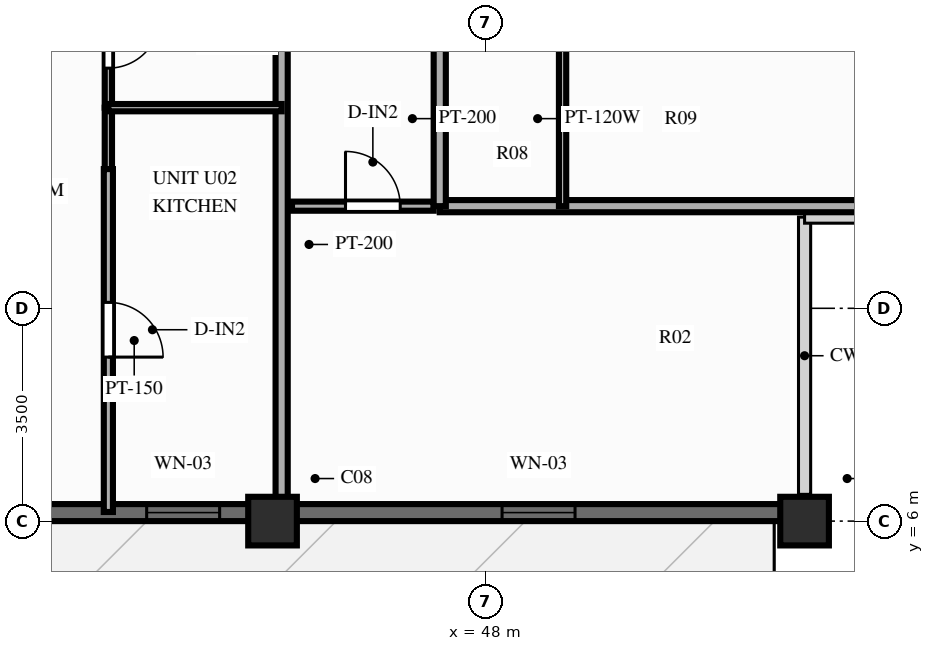
"""IFC4 building model, lengths in metres.
Left out: names, types, materials, properties, quantities, classifications, styles, units other than length and angle.
Written with IfcOpenShell. Run it as: python <this file> out.ifc"""

import sys

from ifc_helpers import new_model, si_unit, direction, frame, frame_2d, origin, origin_2d, place, context, subcontext, project, spatial, rectangle, extrude, source, transform, mapped, element, fill, save


model = new_model("IFC4")
c1 = context("Model", 3, precision=1e-05, world=origin(), true_north=direction((0.0, 1.0)))
c2 = subcontext(c1, "Body", "Model", "MODEL_VIEW")
j1 = project(units=[si_unit("LENGTHUNIT", "METRE"), si_unit("PLANEANGLEUNIT", "RADIAN")], contexts=[c1])
p1 = place(None, origin())
s1 = spatial("IfcSite", under=j1, at=p1, CompositionType="ELEMENT")
p2 = place(p1, origin())
s2 = spatial("IfcBuilding", under=s1, at=p2, CompositionType="ELEMENT")
p3 = place(p2, frame((0.0, 0.0, 176.8)))
s3 = spatial("IfcBuildingStorey", under=s2, at=p3, CompositionType="ELEMENT", Elevation=176.8)
m1 = source(origin(), c2, "Body", "SweptSolid", [
    extrude(rectangle(XDim=0.8, YDim=0.8, at=origin_2d()), origin(), (0.0, 0.0, 1.0), 3.0),
])
for number, where, z_axis, x_axis in (
    (1, (44.5, 6.0, 0.0), (0.0, 0.0, 1.0), (1.0, 0.0, 0.0)),
    (2, (53.25, 6.0, 0.0), (0.0, 0.0, 1.0), (1.0, 0.0, 0.0)),
):
    element("IfcColumn", number, at=place(p3, frame(where, z_axis=z_axis, x_axis=x_axis)), inside=s3, PredefinedType="COLUMN", context=c2, shape_type="MappedRepresentation", body=[
        mapped(m1, transform((0.0, 0.0, 0.0), scale=1.0)),
    ])
p4 = place(p3, frame((22.75, 6.14, 0.0), z_axis=(0.0, 0.0, 1.0), x_axis=(1.0, 0.0, 0.0)))
e3 = element("IfcWall", 3, at=p4, inside=s3, PredefinedType="SOLIDWALL", context=c2, shape_type="SweptSolid", body=[
    extrude(rectangle(XDim=30.5, YDim=0.28, at=frame_2d((15.25, 0.0))), origin(), (0.0, 0.0, 1.0), 2.28),
])
p5 = place(p4, frame((4.925, 0.0, 0.0), z_axis=(0.0, 0.0, 1.0), x_axis=(-1.0, 0.0, 0.0)))
e4 = element("IfcOpeningElement", 4, at=p5, cuts=e3, PredefinedType="OPENING", context=c2, shape_type="SweptSolid", body=[
    extrude(rectangle(XDim=1.1, YDim=2.15, at=frame_2d((0.55, 1.075))), frame((0.0, 0.152, 0.0), z_axis=(0.0, -1.0, 0.0), x_axis=(1.0, 0.0, 0.0)), (0.0, 0.0, 1.0), 0.304),
])
p6 = place(p4, frame((9.42, 0.0, 0.25)))
e5 = element("IfcOpeningElement", 5, at=p6, cuts=e3, PredefinedType="OPENING", context=c2, shape_type="SweptSolid", body=[
    extrude(rectangle(XDim=0.95, YDim=1.5, at=frame_2d((0.475, 0.75))), frame((0.0, 0.152, 0.0), z_axis=(0.0, -1.0, 0.0), x_axis=(1.0, 0.0, 0.0)), (0.0, 0.0, 1.0), 0.304),
])
p7 = place(p4, frame((11.244, 0.0, 0.25)))
e6 = element("IfcOpeningElement", 6, at=p7, cuts=e3, PredefinedType="OPENING", context=c2, shape_type="SweptSolid", body=[
    extrude(rectangle(XDim=1.2, YDim=1.5, at=frame_2d((0.6, 0.75))), frame((0.0, 0.152, 0.0), z_axis=(0.0, -1.0, 0.0), x_axis=(1.0, 0.0, 0.0)), (0.0, 0.0, 1.0), 0.304),
])
p8 = place(p4, frame((13.602, 0.0, 0.25)))
e7 = element("IfcOpeningElement", 7, at=p8, cuts=e3, PredefinedType="OPENING", context=c2, shape_type="SweptSolid", body=[
    extrude(rectangle(XDim=1.2, YDim=1.5, at=frame_2d((0.6, 0.75))), frame((0.0, 0.152, 0.0), z_axis=(0.0, -1.0, 0.0), x_axis=(1.0, 0.0, 0.0)), (0.0, 0.0, 1.0), 0.304),
])
p9 = place(p4, frame((16.683, 0.0, 0.25)))
e8 = element("IfcOpeningElement", 8, at=p9, cuts=e3, PredefinedType="OPENING", context=c2, shape_type="SweptSolid", body=[
    extrude(rectangle(XDim=1.2, YDim=1.5, at=frame_2d((0.6, 0.75))), frame((0.0, 0.152, 0.0), z_axis=(0.0, -1.0, 0.0), x_axis=(1.0, 0.0, 0.0)), (0.0, 0.0, 1.0), 0.304),
])
p10 = place(p4, frame((19.68, 0.0, 0.25)))
e9 = element("IfcOpeningElement", 9, at=p10, cuts=e3, PredefinedType="OPENING", context=c2, shape_type="SweptSolid", body=[
    extrude(rectangle(XDim=1.2, YDim=1.5, at=frame_2d((0.6, 0.75))), frame((0.0, 0.152, 0.0), z_axis=(0.0, -1.0, 0.0), x_axis=(1.0, 0.0, 0.0)), (0.0, 0.0, 1.0), 0.304),
])
p11 = place(p4, frame((25.525, 0.0, 0.25)))
e10 = element("IfcOpeningElement", 10, at=p11, cuts=e3, PredefinedType="OPENING", context=c2, shape_type="SweptSolid", body=[
    extrude(rectangle(XDim=1.2, YDim=1.5, at=frame_2d((0.6, 0.75))), frame((0.0, 0.152, 0.0), z_axis=(0.0, -1.0, 0.0), x_axis=(1.0, 0.0, 0.0)), (0.0, 0.0, 1.0), 0.304),
])
p12 = place(p3, frame((44.82, 11.18, 0.0), z_axis=(0.0, 0.0, 1.0), x_axis=(1.0, 0.0, 0.0)))
e11 = element("IfcWall", 11, at=p12, inside=s3, PredefinedType="PARTITIONING", context=c2, shape_type="SweptSolid", body=[
    extrude(rectangle(XDim=2.33, YDim=0.15, at=frame_2d((1.165, 0.0))), origin(), (0.0, 0.0, 1.0), 2.79),
])
p13 = place(p12, frame((0.88, 0.0, 0.0)))
e12 = element("IfcOpeningElement", 12, at=p13, cuts=e11, PredefinedType="OPENING", context=c2, shape_type="SweptSolid", body=[
    extrude(rectangle(XDim=0.9, YDim=2.1, at=frame_2d((0.45, 1.05))), frame((0.0, 0.087, 0.0), z_axis=(0.0, -1.0, 0.0), x_axis=(1.0, 0.0, 0.0)), (0.0, 0.0, 1.0), 0.174),
])
p14 = place(p3, frame((44.65, 14.95, 0.0), z_axis=(0.0, 0.0, 1.0), x_axis=(0.0, -1.0, 0.0)))
e13 = element("IfcWall", 13, at=p14, inside=s3, PredefinedType="PARTITIONING", context=c2, shape_type="SweptSolid", body=[
    extrude(rectangle(XDim=8.8, YDim=0.2, at=frame_2d((4.4, 0.0))), origin(), (0.0, 0.0, 1.0), 2.39),
])
p15 = place(p3, frame((41.8, 14.95, 0.0), z_axis=(0.0, 0.0, 1.0), x_axis=(0.0, -1.0, 0.0)))
e14 = element("IfcWall", 14, at=p15, inside=s3, PredefinedType="PARTITIONING", context=c2, shape_type="SweptSolid", body=[
    extrude(rectangle(XDim=2.15, YDim=0.12, at=frame_2d((1.075, 0.0))), origin(), (0.0, 0.0, 1.0), 2.79),
])
p16 = place(p15, frame((0.65, 0.0, 0.0)))
e15 = element("IfcOpeningElement", 15, at=p16, cuts=e14, PredefinedType="OPENING", context=c2, shape_type="SweptSolid", body=[
    extrude(rectangle(XDim=0.85, YDim=2.05, at=frame_2d((0.425, 1.025))), frame((0.0, 0.072, 0.0), z_axis=(0.0, -1.0, 0.0), x_axis=(1.0, 0.0, 0.0)), (0.0, 0.0, 1.0), 0.144),
])
p17 = place(p3, frame((41.8, 12.8, 0.0), z_axis=(0.0, 0.0, 1.0), x_axis=(0.0, -1.0, 0.0)))
e16 = element("IfcWall", 16, at=p17, inside=s3, PredefinedType="PARTITIONING", context=c2, shape_type="SweptSolid", body=[
    extrude(rectangle(XDim=1.01, YDim=0.12, at=frame_2d((0.505, 0.0))), origin(), (0.0, 0.0, 1.0), 2.79),
])
p18 = place(p3, frame((41.8, 12.8, 0.0), z_axis=(0.0, 0.0, 1.0), x_axis=(1.0, 0.0, 0.0)))
e17 = element("IfcWall", 17, at=p18, inside=s3, PredefinedType="PARTITIONING", context=c2, shape_type="SweptSolid", body=[
    extrude(rectangle(XDim=2.85, YDim=0.12, at=frame_2d((1.425, 0.0))), origin(), (0.0, 0.0, 1.0), 2.79),
])
p19 = place(p3, frame((41.8, 11.79, 0.0), z_axis=(0.0, 0.0, 1.0), x_axis=(0.0, -1.0, 0.0)))
e18 = element("IfcWall", 18, at=p19, inside=s3, PredefinedType="PARTITIONING", context=c2, shape_type="SweptSolid", body=[
    extrude(rectangle(XDim=5.64, YDim=0.15, at=frame_2d((2.82, 0.0))), origin(), (0.0, 0.0, 1.0), 2.79),
])
p20 = place(p19, frame((2.192, 0.0, 0.0)))
e19 = element("IfcOpeningElement", 19, at=p20, cuts=e18, PredefinedType="OPENING", context=c2, shape_type="SweptSolid", body=[
    extrude(rectangle(XDim=0.9, YDim=2.1, at=frame_2d((0.45, 1.05))), frame((0.0, 0.087, 0.0), z_axis=(0.0, -1.0, 0.0), x_axis=(1.0, 0.0, 0.0)), (0.0, 0.0, 1.0), 0.174),
])
p21 = place(p3, frame((47.25, 11.18, 0.0), z_axis=(0.0, 0.0, 1.0), x_axis=(1.0, 0.0, 0.0)))
e20 = element("IfcWall", 20, at=p21, inside=s3, PredefinedType="PARTITIONING", context=c2, shape_type="SweptSolid", body=[
    extrude(rectangle(XDim=10.85, YDim=0.2, at=frame_2d((5.425, 0.0))), origin(), (0.0, 0.0, 1.0), 2.79),
])
p22 = place(p3, frame((47.25, 11.18, 0.0), z_axis=(0.0, 0.0, 1.0), x_axis=(0.0, 1.0, 0.0)))
e21 = element("IfcWall", 21, at=p22, inside=s3, PredefinedType="PARTITIONING", context=c2, shape_type="SweptSolid", body=[
    extrude(rectangle(XDim=2.879, YDim=0.2, at=frame_2d((1.439, 0.0))), origin(), (0.0, 0.0, 1.0), 2.79),
])
p23 = place(p3, frame((49.27, 11.18, 0.0), z_axis=(0.0, 0.0, 1.0), x_axis=(0.0, 1.0, 0.0)))
e22 = element("IfcWall", 22, at=p23, inside=s3, PredefinedType="PARTITIONING", context=c2, shape_type="SweptSolid", body=[
    extrude(rectangle(XDim=2.879, YDim=0.12, at=frame_2d((1.439, 0.0))), origin(), (0.0, 0.0, 1.0), 2.79),
])
m2 = source(origin(), c2, "Body", "SweptSolid", [
    extrude(rectangle(XDim=1.2, YDim=1.5, at=frame_2d((0.6, 0.75))), frame((0.0, 0.03, 0.0), z_axis=(0.0, -1.0, 0.0), x_axis=(1.0, 0.0, 0.0)), (0.0, 0.0, 1.0), 0.06),
])
p24 = place(p10, origin())
e23 = element("IfcWindow", 23, at=p24, inside=s3, PartitioningType="SINGLE_PANEL", PredefinedType="WINDOW", context=c2, shape_type="MappedRepresentation", body=[
    mapped(m2, transform((0.0, 0.0, 0.0), scale=1.0)),
])
fill(e9, e23)
p25 = place(p11, origin())
e24 = element("IfcWindow", 24, at=p25, inside=s3, PartitioningType="SINGLE_PANEL", PredefinedType="WINDOW", context=c2, shape_type="MappedRepresentation", body=[
    mapped(m2, transform((0.0, 0.0, 0.0), scale=1.0)),
])
fill(e10, e24)
m3 = source(origin(), c2, "Body", "SweptSolid", [
    extrude(rectangle(XDim=0.9, YDim=2.1, at=frame_2d((0.45, 1.05))), frame((0.0, 0.025, 0.0), z_axis=(0.0, -1.0, 0.0), x_axis=(1.0, 0.0, 0.0)), (0.0, 0.0, 1.0), 0.05),
])
p26 = place(p13, origin())
e25 = element("IfcDoor", 25, at=p26, inside=s3, OperationType="SINGLE_SWING_LEFT", PredefinedType="DOOR", context=c2, shape_type="MappedRepresentation", body=[
    mapped(m3, transform((0.0, 0.0, 0.0), scale=1.0)),
])
fill(e12, e25)
m4 = source(origin(), c2, "Body", "SweptSolid", [
    extrude(rectangle(XDim=0.85, YDim=2.05, at=frame_2d((0.425, 1.025))), frame((0.0, 0.025, 0.0), z_axis=(0.0, -1.0, 0.0), x_axis=(1.0, 0.0, 0.0)), (0.0, 0.0, 1.0), 0.05),
])
p27 = place(p16, origin())
e26 = element("IfcDoor", 26, at=p27, inside=s3, OperationType="SINGLE_SWING_LEFT", PredefinedType="DOOR", context=c2, shape_type="MappedRepresentation", body=[
    mapped(m4, transform((0.0, 0.0, 0.0), scale=1.0)),
])
fill(e15, e26)
p28 = place(p20, origin())
e27 = element("IfcDoor", 27, at=p28, inside=s3, OperationType="SINGLE_SWING_RIGHT", PredefinedType="DOOR", context=c2, shape_type="MappedRepresentation", body=[
    mapped(m3, transform((0.0, 0.0, 0.0), scale=1.0)),
])
fill(e19, e27)
save(model, sys.argv[1])
